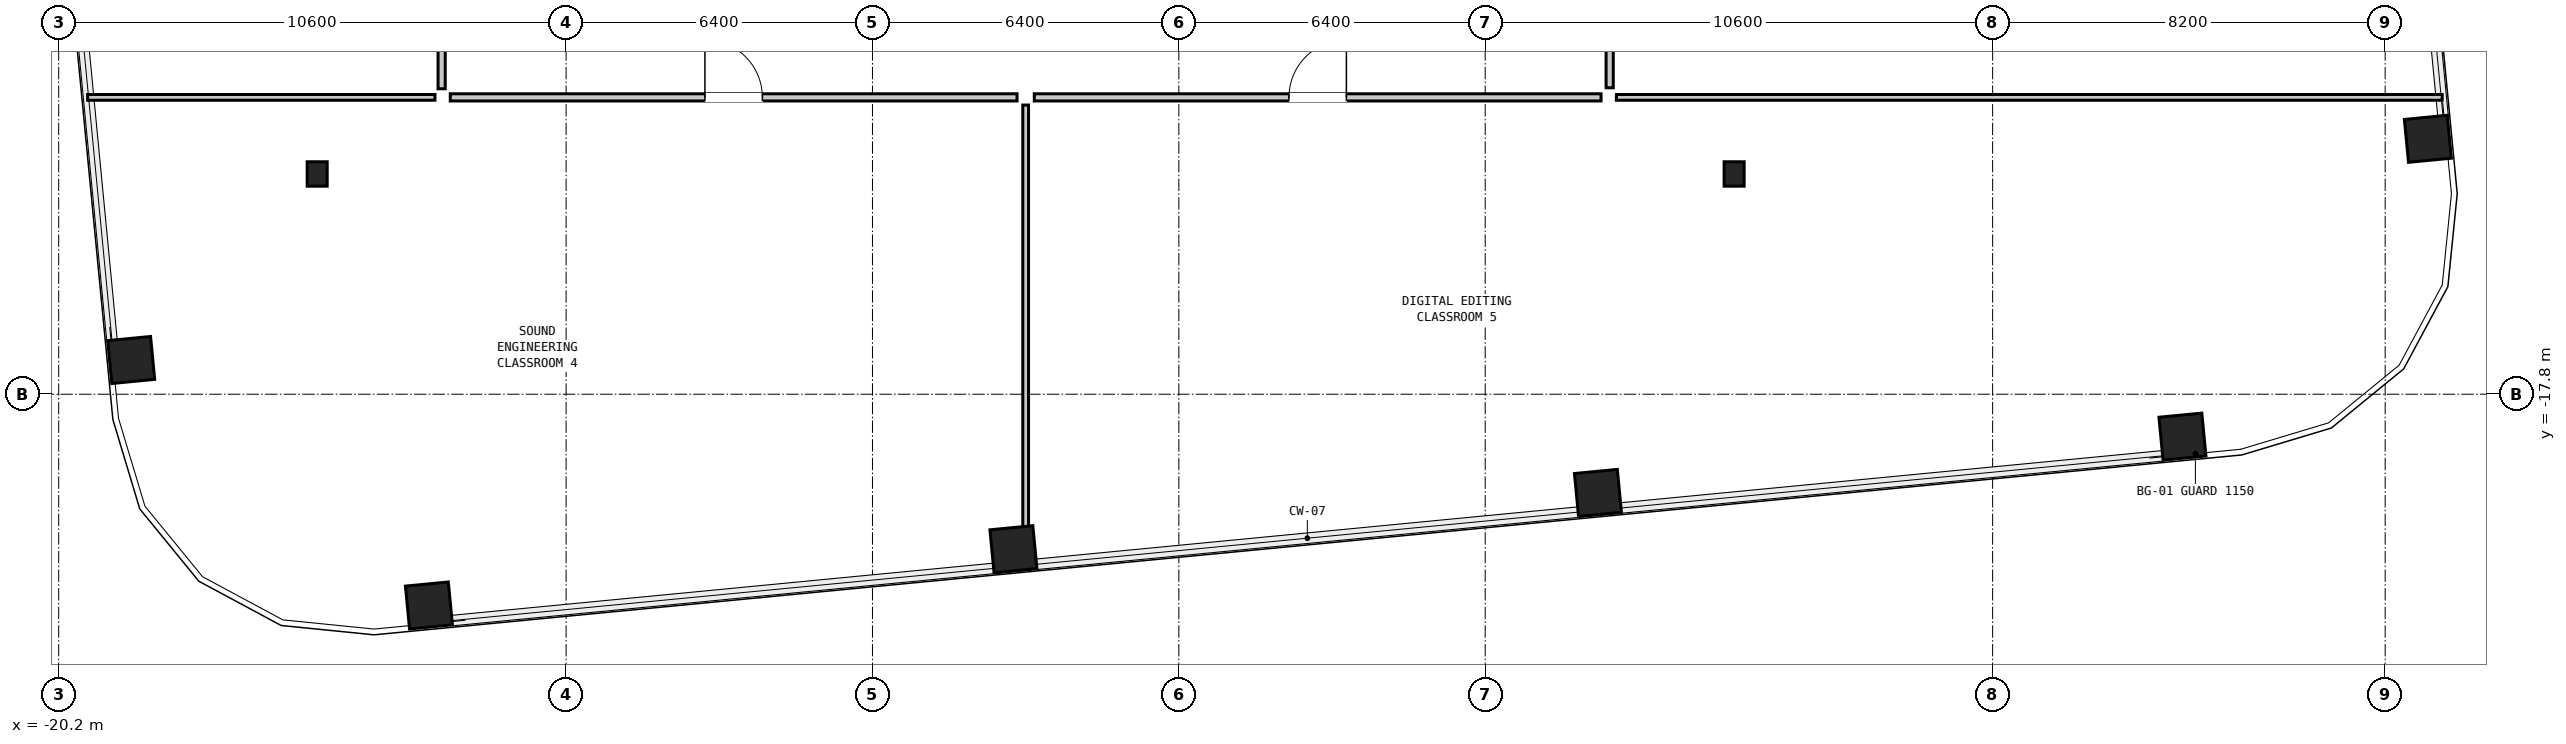
"""IFC4 building model, lengths in metres.
Left out: names, types, materials, properties, quantities, classifications, styles, units other than length and angle.
Written with IfcOpenShell. Run it as: python <this file> out.ifc"""

import sys

from ifc_helpers import new_model, si_unit, direction, frame, frame_2d, origin, origin_2d, place, context, subcontext, project, spatial, rectangle, hollow_rectangle, i_section, extrude, element, fill, save


model = new_model("IFC4")
c1 = context("Model", 3, precision=1e-05, world=origin(), true_north=direction((0.0, 1.0)))
c2 = subcontext(c1, "Body", "Model", "MODEL_VIEW")
j1 = project(units=[si_unit("LENGTHUNIT", "METRE"), si_unit("PLANEANGLEUNIT", "RADIAN")], contexts=[c1])
p1 = place(None, origin())
s1 = spatial("IfcSite", under=j1, at=p1, CompositionType="ELEMENT")
p2 = place(p1, origin())
s2 = spatial("IfcBuilding", under=s1, at=p2, CompositionType="ELEMENT")
p3 = place(p2, frame((0.0, 0.0, 96.9)))
s3 = spatial("IfcBuildingStorey", under=s2, at=p3, CompositionType="ELEMENT", Elevation=96.9)
for number, where, z_axis, x_axis in (
    (1, (-12.465, -22.213, 0.0), (0.0, 0.0, 1.0), (0.995, 0.096, 0.0)),
    (2, (-0.255, -21.037, 0.0), (0.0, 0.0, 1.0), (0.995, 0.096, 0.0)),
    (3, (11.955, -19.861, 0.0), (0.0, 0.0, 1.0), (0.995, 0.096, 0.0)),
    (4, (24.165, -18.686, 0.0), (0.0, 0.0, 1.0), (0.995, 0.096, 0.0)),
    (5, (29.292, -12.465, 0.0), (0.0, 0.0, 1.0), (-0.096, 0.995, 0.0)),
    (6, (-18.686, -17.085, 0.0), (0.0, 0.0, 1.0), (-0.096, 0.995, 0.0)),
):
    element("IfcColumn", number, at=place(p3, frame(where, z_axis=z_axis, x_axis=x_axis)), inside=s3, PredefinedType="COLUMN", context=c2, shape_type="SweptSolid", body=[
        extrude(hollow_rectangle(XDim=0.9, YDim=0.9, WallThickness=0.055, at=origin_2d()), origin(), (0.0, 0.0, 1.0), 4.35),
    ])
for number, where, z_axis, x_axis in (
    (7, (-14.8, -13.2, 0.0), (0.0, 0.0, 1.0), (1.0, 0.0, 0.0)),
    (8, (14.8, -13.2, 0.0), (0.0, 0.0, 1.0), (1.0, 0.0, 0.0)),
):
    element("IfcColumn", number, at=place(p3, frame(where, z_axis=z_axis, x_axis=x_axis)), inside=s3, PredefinedType="COLUMN", context=c2, shape_type="SweptSolid", body=[
        extrude(i_section(OverallWidth=0.418, OverallDepth=0.51, WebThickness=0.042, FlangeThickness=0.068, at=origin_2d()), origin(), (0.0, 0.0, 1.0), 4.35),
    ])
p4 = place(p3, frame((-19.595, -11.6, 0.0), z_axis=(0.0, 0.0, 1.0), x_axis=(1.0, 0.0, 0.0)))
e9 = element("IfcWall", 9, at=p4, inside=s3, PredefinedType="PARTITIONING", context=c2, shape_type="SweptSolid", body=[
    extrude(rectangle(XDim=7.255, YDim=0.12, at=frame_2d((3.628, 0.0))), origin(), (0.0, 0.0, 1.0), 3.288),
])
p5 = place(p3, frame((12.34, -11.6, 0.0), z_axis=(0.0, 0.0, 1.0), x_axis=(1.0, 0.0, 0.0)))
e10 = element("IfcWall", 10, at=p5, inside=s3, PredefinedType="PARTITIONING", context=c2, shape_type="SweptSolid", body=[
    extrude(rectangle(XDim=17.251, YDim=0.12, at=frame_2d((8.625, 0.0))), origin(), (0.0, 0.0, 1.0), 3.288),
])
p6 = place(p3, frame((0.0, -21.394, 0.0), z_axis=(0.0, 0.0, 1.0), x_axis=(0.0, 1.0, 0.0)))
e11 = element("IfcWall", 11, at=p6, inside=s3, PredefinedType="PARTITIONING", context=c2, shape_type="SweptSolid", body=[
    extrude(rectangle(XDim=9.634, YDim=0.12, at=frame_2d((4.817, 0.0))), origin(), (0.0, 0.0, 1.0), 2.25),
])
p7 = place(p3, frame((-12.02, -11.6, 0.0), z_axis=(0.0, 0.0, 1.0), x_axis=(1.0, 0.0, 0.0)))
e12 = element("IfcWall", 12, at=p7, inside=s3, PredefinedType="PARTITIONING", context=c2, shape_type="SweptSolid", body=[
    extrude(rectangle(XDim=11.84, YDim=0.15, at=frame_2d((5.92, 0.0))), origin(), (0.0, 0.0, 1.0), 3.288),
])
p8 = place(p7, frame((5.32, 0.0, 0.0)))
e13 = element("IfcOpeningElement", 13, at=p8, cuts=e12, PredefinedType="OPENING", context=c2, shape_type="SweptSolid", body=[
    extrude(rectangle(XDim=1.2, YDim=2.1, at=frame_2d((0.6, 1.05))), frame((0.0, 0.087, 0.0), z_axis=(0.0, -1.0, 0.0), x_axis=(1.0, 0.0, 0.0)), (0.0, 0.0, 1.0), 0.174),
])
p9 = place(p3, frame((0.18, -11.6, 0.0), z_axis=(0.0, 0.0, 1.0), x_axis=(1.0, 0.0, 0.0)))
e14 = element("IfcWall", 14, at=p9, inside=s3, PredefinedType="PARTITIONING", context=c2, shape_type="SweptSolid", body=[
    extrude(rectangle(XDim=11.84, YDim=0.15, at=frame_2d((5.92, 0.0))), origin(), (0.0, 0.0, 1.0), 3.288),
])
p10 = place(p9, frame((5.32, 0.0, 0.0)))
e15 = element("IfcOpeningElement", 15, at=p10, cuts=e14, PredefinedType="OPENING", context=c2, shape_type="SweptSolid", body=[
    extrude(rectangle(XDim=1.2, YDim=2.1, at=frame_2d((0.6, 1.05))), frame((0.0, 0.087, 0.0), z_axis=(0.0, -1.0, 0.0), x_axis=(1.0, 0.0, 0.0)), (0.0, 0.0, 1.0), 0.174),
])
p11 = place(p3, frame((-12.2, -11.42, 0.0), z_axis=(0.0, 0.0, 1.0), x_axis=(0.0, 1.0, 0.0)))
e16 = element("IfcWall", 16, at=p11, inside=s3, PredefinedType="PARTITIONING", context=c2, shape_type="SweptSolid", body=[
    extrude(rectangle(XDim=11.24, YDim=0.15, at=frame_2d((5.62, 0.0))), origin(), (0.0, 0.0, 1.0), 2.25),
])
p12 = place(p11, frame((5.02, 0.0, 0.0)))
e17 = element("IfcOpeningElement", 17, at=p12, cuts=e16, PredefinedType="OPENING", context=c2, shape_type="SweptSolid", body=[
    extrude(rectangle(XDim=1.2, YDim=2.1, at=frame_2d((0.6, 1.05))), frame((0.0, 0.087, 0.0), z_axis=(0.0, -1.0, 0.0), x_axis=(1.0, 0.0, 0.0)), (0.0, 0.0, 1.0), 0.174),
])
p13 = place(p3, frame((12.2, -11.4, 0.0), z_axis=(0.0, 0.0, 1.0), x_axis=(0.0, 1.0, 0.0)))
e18 = element("IfcWall", 18, at=p13, inside=s3, PredefinedType="PARTITIONING", context=c2, shape_type="SweptSolid", body=[
    extrude(rectangle(XDim=8.84, YDim=0.15, at=frame_2d((4.42, 0.0))), origin(), (0.0, 0.0, 1.0), 4.07),
])
p14 = place(p13, frame((3.945, 0.0, 0.0)))
e19 = element("IfcOpeningElement", 19, at=p14, cuts=e18, PredefinedType="OPENING", context=c2, shape_type="SweptSolid", body=[
    extrude(rectangle(XDim=0.95, YDim=2.1, at=frame_2d((0.475, 1.05))), frame((0.0, 0.087, 0.0), z_axis=(0.0, -1.0, 0.0), x_axis=(1.0, 0.0, 0.0)), (0.0, 0.0, 1.0), 0.174),
])
p15 = place(p8, origin())
e20 = element("IfcDoor", 20, at=p15, inside=s3, OperationType="SINGLE_SWING_LEFT", PredefinedType="DOOR", context=c2, shape_type="SweptSolid", body=[
    extrude(rectangle(XDim=1.2, YDim=2.1, at=frame_2d((0.6, 1.05))), frame((0.0, 0.025, 0.0), z_axis=(0.0, -1.0, 0.0), x_axis=(1.0, 0.0, 0.0)), (0.0, 0.0, 1.0), 0.05),
])
fill(e13, e20)
p16 = place(p10, origin())
e21 = element("IfcDoor", 21, at=p16, inside=s3, OperationType="SINGLE_SWING_RIGHT", PredefinedType="DOOR", context=c2, shape_type="SweptSolid", body=[
    extrude(rectangle(XDim=1.2, YDim=2.1, at=frame_2d((0.6, 1.05))), frame((0.0, 0.025, 0.0), z_axis=(0.0, -1.0, 0.0), x_axis=(1.0, 0.0, 0.0)), (0.0, 0.0, 1.0), 0.05),
])
fill(e15, e21)
save(model, sys.argv[1])
